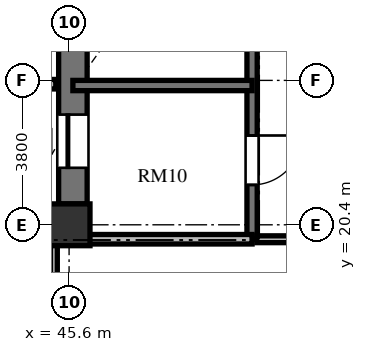
"""IFC4 building model, lengths in metres.
Left out: names, types, materials, properties, quantities, classifications, styles, units other than length and angle.
Written with IfcOpenShell. Run it as: python <this file> out.ifc"""

import sys

from ifc_helpers import new_model, si_unit, direction, frame, frame_2d, origin, origin_2d, place, context, subcontext, project, spatial, rectangle, extrude, element, fill, save


model = new_model("IFC4")
c1 = context("Model", 3, precision=1e-05, world=origin(), true_north=direction((0.0, 1.0)))
c2 = subcontext(c1, "Body", "Model", "MODEL_VIEW")
j1 = project(units=[si_unit("LENGTHUNIT", "METRE"), si_unit("PLANEANGLEUNIT", "RADIAN")], contexts=[c1])
p1 = place(None, origin())
s1 = spatial("IfcSite", under=j1, at=p1, CompositionType="ELEMENT")
p2 = place(p1, origin())
s2 = spatial("IfcBuilding", under=s1, at=p2, CompositionType="ELEMENT")
p3 = place(p2, frame((0.0, 0.0, 92.688)))
s3 = spatial("IfcBuildingStorey", under=s2, at=p3, CompositionType="ELEMENT", Elevation=92.688)
p4 = place(p3, frame((45.6, 20.4, 0.0), z_axis=(0.0, 0.0, 1.0), x_axis=(1.0, 0.0, 0.0)))
e1 = element("IfcColumn", 1, at=p4, inside=s3, PredefinedType="COLUMN", context=c2, shape_type="SweptSolid", body=[
    extrude(rectangle(XDim=1.1, YDim=1.1, at=origin_2d()), origin(), (0.0, 0.0, 1.0), 3.648),
])
p5 = place(p3, frame((45.7, 20.95, 0.0), z_axis=(0.0, 0.0, 1.0), x_axis=(0.0, 1.0, 0.0)))
e2 = element("IfcWall", 2, at=p5, inside=s3, PredefinedType="SHEAR", context=c2, shape_type="SweptSolid", body=[
    extrude(rectangle(XDim=14.1, YDim=0.75, at=frame_2d((7.05, 0.0))), origin(), (0.0, 0.0, 1.0), 3.648),
])
p6 = place(p5, frame((11.75, 0.0, 0.0)))
e3 = element("IfcOpeningElement", 3, at=p6, cuts=e2, PredefinedType="OPENING", context=c2, shape_type="SweptSolid", body=[
    extrude(rectangle(XDim=1.4, YDim=2.3, at=frame_2d((0.7, 1.15))), frame((0.0, 0.385, 0.0), z_axis=(0.0, -1.0, 0.0), x_axis=(1.0, 0.0, 0.0)), (0.0, 0.0, 1.0), 0.77),
])
p7 = place(p5, frame((0.95, 0.0, 0.0)))
e4 = element("IfcOpeningElement", 4, at=p7, cuts=e2, PredefinedType="OPENING", context=c2, shape_type="SweptSolid", body=[
    extrude(rectangle(XDim=1.4, YDim=2.3, at=frame_2d((0.7, 1.15))), frame((0.0, 0.385, 0.0), z_axis=(0.0, -1.0, 0.0), x_axis=(1.0, 0.0, 0.0)), (0.0, 0.0, 1.0), 0.77),
])
p8 = place(p3, frame((42.95, 24.1, 0.0), z_axis=(0.0, 0.0, 1.0), x_axis=(1.0, 0.0, 0.0)))
e5 = element("IfcWall", 5, at=p8, inside=s3, PredefinedType="SOLIDWALL", context=c2, shape_type="SweptSolid", body=[
    extrude(rectangle(XDim=2.3, YDim=0.25, at=frame_2d((1.15, 0.0))), origin(), (0.0, 0.0, 1.0), 3.428),
])
p9 = place(p3, frame((50.415, 35.845, 0.0), z_axis=(0.0, 0.0, 1.0), x_axis=(0.0, -1.0, 0.0)))
e6 = element("IfcWall", 6, at=p9, inside=s3, PredefinedType="SHEAR", context=c2, shape_type="SweptSolid", body=[
    extrude(rectangle(XDim=15.825, YDim=0.27, at=frame_2d((7.913, 0.0))), origin(), (0.0, 0.0, 1.0), 3.648),
])
p10 = place(p9, frame((4.445, 0.0, 0.0)))
e7 = element("IfcOpeningElement", 7, at=p10, cuts=e6, PredefinedType="OPENING", context=c2, shape_type="SweptSolid", body=[
    extrude(rectangle(XDim=1.2, YDim=2.15, at=frame_2d((0.6, 1.075))), frame((0.0, 0.145, 0.0), z_axis=(0.0, -1.0, 0.0), x_axis=(1.0, 0.0, 0.0)), (0.0, 0.0, 1.0), 0.29),
])
p11 = place(p9, frame((1.295, 0.0, 0.0)))
e8 = element("IfcOpeningElement", 8, at=p11, cuts=e6, PredefinedType="OPENING", context=c2, shape_type="SweptSolid", body=[
    extrude(rectangle(XDim=1.3, YDim=2.2, at=frame_2d((0.65, 1.1))), frame((0.0, 0.145, 0.0), z_axis=(0.0, -1.0, 0.0), x_axis=(1.0, 0.0, 0.0)), (0.0, 0.0, 1.0), 0.29),
])
p12 = place(p9, frame((13.095, 0.0, 0.0)))
e9 = element("IfcOpeningElement", 9, at=p12, cuts=e6, PredefinedType="OPENING", context=c2, shape_type="SweptSolid", body=[
    extrude(rectangle(XDim=1.3, YDim=2.2, at=frame_2d((0.65, 1.1))), frame((0.0, 0.145, 0.0), z_axis=(0.0, -1.0, 0.0), x_axis=(1.0, 0.0, 0.0)), (0.0, 0.0, 1.0), 0.29),
])
p13 = place(p3, frame((45.7, 24.065, 0.0), z_axis=(0.0, 0.0, 1.0), x_axis=(1.0, 0.0, 0.0)))
e10 = element("IfcWall", 10, at=p13, inside=s3, PredefinedType="SHEAR", context=c2, shape_type="SweptSolid", body=[
    extrude(rectangle(XDim=4.715, YDim=0.27, at=frame_2d((2.357, 0.0))), origin(), (0.0, 0.0, 1.0), 3.648),
])
p14 = place(p3, frame((45.7, 20.02, 0.0), z_axis=(0.0, 0.0, 1.0), x_axis=(1.0, 0.0, 0.0)))
e11 = element("IfcWall", 11, at=p14, inside=s3, PredefinedType="SOLIDWALL", context=c2, shape_type="SweptSolid", body=[
    extrude(rectangle(XDim=4.715, YDim=0.25, at=frame_2d((2.357, 0.0))), origin(), (0.0, 0.0, 1.0), 3.428),
])
p15 = place(p3, frame((53.19, 20.02, 0.0), z_axis=(0.0, 0.0, 1.0), x_axis=(-1.0, 0.0, 0.0)))
e12 = element("IfcWall", 12, at=p15, inside=s3, PredefinedType="PARTITIONING", context=c2, shape_type="SweptSolid", body=[
    extrude(rectangle(XDim=2.65, YDim=0.18, at=frame_2d((1.325, 0.0))), origin(), (0.0, 0.0, 1.0), 3.428),
])
p16 = place(p3, frame((45.2, 19.91, 0.0), z_axis=(0.0, 0.0, 1.0), x_axis=(0.0, -1.0, 0.0)))
e13 = element("IfcWall", 13, at=p16, inside=s3, PredefinedType="PARTITIONING", context=c2, shape_type="SweptSolid", body=[
    extrude(rectangle(XDim=2.55, YDim=0.18, at=frame_2d((1.275, 0.0))), origin(), (0.0, 0.0, 1.0), 3.428),
])
p17 = place(p7, origin())
e14 = element("IfcDoor", 14, at=p17, inside=s3, OperationType="SLIDING_TO_LEFT", PredefinedType="DOOR", context=c2, shape_type="SweptSolid", body=[
    extrude(rectangle(XDim=1.4, YDim=2.3, at=frame_2d((0.7, 1.15))), frame((0.0, 0.025, 0.0), z_axis=(0.0, -1.0, 0.0), x_axis=(1.0, 0.0, 0.0)), (0.0, 0.0, 1.0), 0.05),
])
fill(e4, e14)
p18 = place(p12, origin())
e15 = element("IfcDoor", 15, at=p18, inside=s3, OperationType="SINGLE_SWING_LEFT", PredefinedType="DOOR", context=c2, shape_type="SweptSolid", body=[
    extrude(rectangle(XDim=1.3, YDim=2.2, at=frame_2d((0.65, 1.1))), frame((0.0, 0.025, 0.0), z_axis=(0.0, -1.0, 0.0), x_axis=(1.0, 0.0, 0.0)), (0.0, 0.0, 1.0), 0.05),
])
fill(e9, e15)
save(model, sys.argv[1])
